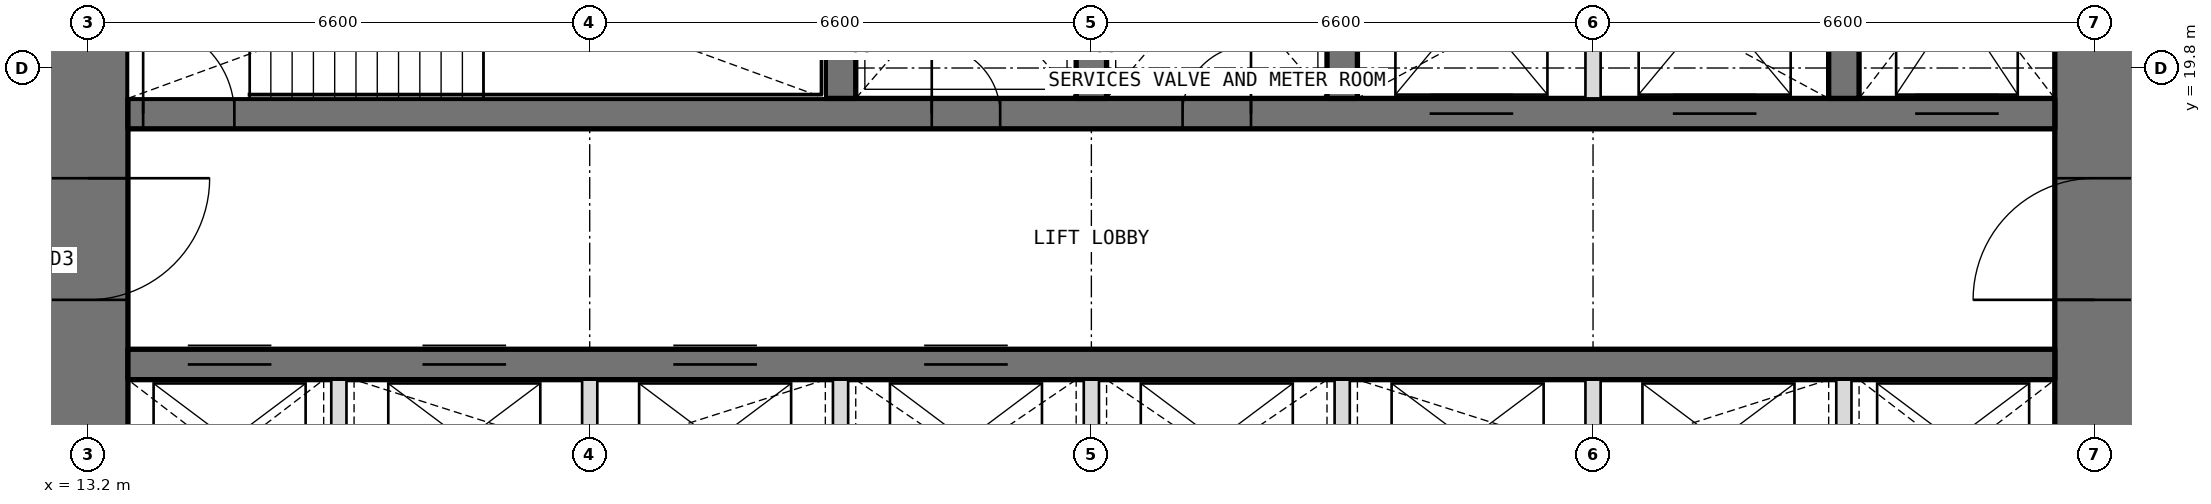
"""IFC4 building model, lengths in metres.
Left out: names, types, materials, properties, quantities, classifications, styles, units other than length and angle.
Written with IfcOpenShell. Run it as: python <this file> out.ifc"""

import sys

from ifc_helpers import new_model, si_unit, direction, frame, frame_2d, origin, place, context, subcontext, project, spatial, rectangle, extrude, element, fill, save


model = new_model("IFC4")
c1 = context("Model", 3, precision=1e-05, world=origin(), true_north=direction((0.0, 1.0)))
c2 = subcontext(c1, "Body", "Model", "MODEL_VIEW")
j1 = project(units=[si_unit("LENGTHUNIT", "METRE"), si_unit("PLANEANGLEUNIT", "RADIAN")], contexts=[c1])
p1 = place(None, origin())
s1 = spatial("IfcSite", under=j1, at=p1, CompositionType="ELEMENT")
p2 = place(p1, origin())
s2 = spatial("IfcBuilding", under=s1, at=p2, CompositionType="ELEMENT")
p3 = place(p2, frame((0.0, 0.0, 59.1)))
s3 = spatial("IfcBuildingStorey", under=s2, at=p3, CompositionType="ELEMENT", Elevation=59.1)
p4 = place(p3, frame((39.6, 13.725, 0.0), z_axis=(0.0, 0.0, 1.0), x_axis=(0.0, 1.0, 0.0)))
e1 = element("IfcWall", 1, at=p4, inside=s3, PredefinedType="SHEAR", context=c2, shape_type="SweptSolid", body=[
    extrude(rectangle(XDim=18.75, YDim=1.05, at=frame_2d((9.375, 0.0))), origin(), (0.0, 0.0, 1.0), 4.2),
])
p5 = place(p4, frame((3.025, 0.0, 0.0)))
e2 = element("IfcOpeningElement", 2, at=p5, cuts=e1, PredefinedType="OPENING", context=c2, shape_type="SweptSolid", body=[
    extrude(rectangle(XDim=1.6, YDim=2.1, at=frame_2d((0.8, 1.05))), frame((0.0, 0.535, 0.0), z_axis=(0.0, -1.0, 0.0), x_axis=(1.0, 0.0, 0.0)), (0.0, 0.0, 1.0), 1.07),
])
p6 = place(p4, frame((13.825, 0.0, 0.0)))
e3 = element("IfcOpeningElement", 3, at=p6, cuts=e1, PredefinedType="OPENING", context=c2, shape_type="SweptSolid", body=[
    extrude(rectangle(XDim=1.6, YDim=2.1, at=frame_2d((0.8, 1.05))), frame((0.0, 0.535, 0.0), z_axis=(0.0, -1.0, 0.0), x_axis=(1.0, 0.0, 0.0)), (0.0, 0.0, 1.0), 1.07),
])
p7 = place(p3, frame((13.2, 32.475, 0.0), z_axis=(0.0, 0.0, 1.0), x_axis=(0.0, -1.0, 0.0)))
e4 = element("IfcWall", 4, at=p7, inside=s3, PredefinedType="SHEAR", context=c2, shape_type="SweptSolid", body=[
    extrude(rectangle(XDim=18.75, YDim=1.05, at=frame_2d((9.375, 0.0))), origin(), (0.0, 0.0, 1.0), 4.2),
])
p8 = place(p7, frame((14.125, 0.0, 0.0)))
e5 = element("IfcOpeningElement", 5, at=p8, cuts=e4, PredefinedType="OPENING", context=c2, shape_type="SweptSolid", body=[
    extrude(rectangle(XDim=1.6, YDim=2.1, at=frame_2d((0.8, 1.05))), frame((0.0, 0.535, 0.0), z_axis=(0.0, -1.0, 0.0), x_axis=(1.0, 0.0, 0.0)), (0.0, 0.0, 1.0), 1.07),
])
p9 = place(p7, frame((3.325, 0.0, 0.0)))
e6 = element("IfcOpeningElement", 6, at=p9, cuts=e4, PredefinedType="OPENING", context=c2, shape_type="SweptSolid", body=[
    extrude(rectangle(XDim=1.6, YDim=2.1, at=frame_2d((0.8, 1.05))), frame((0.0, 0.535, 0.0), z_axis=(0.0, -1.0, 0.0), x_axis=(1.0, 0.0, 0.0)), (0.0, 0.0, 1.0), 1.07),
])
p10 = place(p3, frame((13.725, 15.9, 0.0), z_axis=(0.0, 0.0, 1.0), x_axis=(1.0, 0.0, 0.0)))
e7 = element("IfcWall", 7, at=p10, inside=s3, PredefinedType="SHEAR", context=c2, shape_type="SweptSolid", body=[
    extrude(rectangle(XDim=25.35, YDim=0.4, at=frame_2d((12.675, 0.0))), origin(), (0.0, 0.0, 1.0), 4.2),
])
p11 = place(p10, frame((0.788, 0.0, 0.0)))
e8 = element("IfcOpeningElement", 8, at=p11, cuts=e7, PredefinedType="OPENING", context=c2, shape_type="SweptSolid", body=[
    extrude(rectangle(XDim=1.1, YDim=2.1, at=frame_2d((0.55, 1.05))), frame((0.0, 0.21, 0.0), z_axis=(0.0, -1.0, 0.0), x_axis=(1.0, 0.0, 0.0)), (0.0, 0.0, 1.0), 0.42),
])
p12 = place(p10, frame((3.875, 0.0, 0.0)))
e9 = element("IfcOpeningElement", 9, at=p12, cuts=e7, PredefinedType="OPENING", context=c2, shape_type="SweptSolid", body=[
    extrude(rectangle(XDim=1.1, YDim=2.1, at=frame_2d((0.55, 1.05))), frame((0.0, 0.21, 0.0), z_axis=(0.0, -1.0, 0.0), x_axis=(1.0, 0.0, 0.0)), (0.0, 0.0, 1.0), 0.42),
])
p13 = place(p10, frame((7.175, 0.0, 0.0)))
e10 = element("IfcOpeningElement", 10, at=p13, cuts=e7, PredefinedType="OPENING", context=c2, shape_type="SweptSolid", body=[
    extrude(rectangle(XDim=1.1, YDim=2.1, at=frame_2d((0.55, 1.05))), frame((0.0, 0.21, 0.0), z_axis=(0.0, -1.0, 0.0), x_axis=(1.0, 0.0, 0.0)), (0.0, 0.0, 1.0), 0.42),
])
p14 = place(p10, frame((10.475, 0.0, 0.0)))
e11 = element("IfcOpeningElement", 11, at=p14, cuts=e7, PredefinedType="OPENING", context=c2, shape_type="SweptSolid", body=[
    extrude(rectangle(XDim=1.1, YDim=2.1, at=frame_2d((0.55, 1.05))), frame((0.0, 0.21, 0.0), z_axis=(0.0, -1.0, 0.0), x_axis=(1.0, 0.0, 0.0)), (0.0, 0.0, 1.0), 0.42),
])
p15 = place(p3, frame((13.725, 19.2, 0.0), z_axis=(0.0, 0.0, 1.0), x_axis=(1.0, 0.0, 0.0)))
e12 = element("IfcWall", 12, at=p15, inside=s3, PredefinedType="SHEAR", context=c2, shape_type="SweptSolid", body=[
    extrude(rectangle(XDim=25.35, YDim=0.4, at=frame_2d((12.675, 0.0))), origin(), (0.0, 0.0, 1.0), 4.2),
])
p16 = place(p15, frame((10.575, 0.0, 0.0)))
e13 = element("IfcOpeningElement", 13, at=p16, cuts=e12, PredefinedType="OPENING", context=c2, shape_type="SweptSolid", body=[
    extrude(rectangle(XDim=0.9, YDim=2.1, at=frame_2d((0.45, 1.05))), frame((0.0, 0.21, 0.0), z_axis=(0.0, -1.0, 0.0), x_axis=(1.0, 0.0, 0.0)), (0.0, 0.0, 1.0), 0.42),
])
p17 = place(p15, frame((13.875, 0.0, 0.0)))
e14 = element("IfcOpeningElement", 14, at=p17, cuts=e12, PredefinedType="OPENING", context=c2, shape_type="SweptSolid", body=[
    extrude(rectangle(XDim=0.9, YDim=2.1, at=frame_2d((0.45, 1.05))), frame((0.0, 0.21, 0.0), z_axis=(0.0, -1.0, 0.0), x_axis=(1.0, 0.0, 0.0)), (0.0, 0.0, 1.0), 0.42),
])
p18 = place(p15, frame((0.2, 0.0, 0.0)))
e15 = element("IfcOpeningElement", 15, at=p18, cuts=e12, PredefinedType="OPENING", context=c2, shape_type="SweptSolid", body=[
    extrude(rectangle(XDim=1.2, YDim=2.1, at=frame_2d((0.6, 1.05))), frame((0.0, 0.21, 0.0), z_axis=(0.0, -1.0, 0.0), x_axis=(1.0, 0.0, 0.0)), (0.0, 0.0, 1.0), 0.42),
])
p19 = place(p15, frame((23.512, 0.0, 0.0)))
e16 = element("IfcOpeningElement", 16, at=p19, cuts=e12, PredefinedType="OPENING", context=c2, shape_type="SweptSolid", body=[
    extrude(rectangle(XDim=1.1, YDim=2.1, at=frame_2d((0.55, 1.05))), frame((0.0, 0.21, 0.0), z_axis=(0.0, -1.0, 0.0), x_axis=(1.0, 0.0, 0.0)), (0.0, 0.0, 1.0), 0.42),
])
p20 = place(p15, frame((17.125, 0.0, 0.0)))
e17 = element("IfcOpeningElement", 17, at=p20, cuts=e12, PredefinedType="OPENING", context=c2, shape_type="SweptSolid", body=[
    extrude(rectangle(XDim=1.1, YDim=2.1, at=frame_2d((0.55, 1.05))), frame((0.0, 0.21, 0.0), z_axis=(0.0, -1.0, 0.0), x_axis=(1.0, 0.0, 0.0)), (0.0, 0.0, 1.0), 0.42),
])
p21 = place(p15, frame((20.325, 0.0, 0.0)))
e18 = element("IfcOpeningElement", 18, at=p21, cuts=e12, PredefinedType="OPENING", context=c2, shape_type="SweptSolid", body=[
    extrude(rectangle(XDim=1.1, YDim=2.1, at=frame_2d((0.55, 1.05))), frame((0.0, 0.21, 0.0), z_axis=(0.0, -1.0, 0.0), x_axis=(1.0, 0.0, 0.0)), (0.0, 0.0, 1.0), 0.42),
])
for number, where, z_axis, x_axis in (
    (19, (23.1, 19.4, 0.0), (0.0, 0.0, 1.0), (0.0, 1.0, 0.0)),
    (20, (26.4, 19.4, 0.0), (0.0, 0.0, 1.0), (0.0, 1.0, 0.0)),
    (21, (29.7, 19.4, 0.0), (0.0, 0.0, 1.0), (0.0, 1.0, 0.0)),
    (22, (36.3, 19.4, 0.0), (0.0, 0.0, 1.0), (0.0, 1.0, 0.0)),
):
    element("IfcWall", number, at=place(p3, frame(where, z_axis=z_axis, x_axis=x_axis)), inside=s3, PredefinedType="SHEAR", context=c2, shape_type="SweptSolid", body=[
        extrude(rectangle(XDim=3.35, YDim=0.4, at=frame_2d((1.675, 0.0))), origin(), (0.0, 0.0, 1.0), 4.2),
    ])
for number, where, z_axis, x_axis in (
    (23, (16.5, 13.725, 0.0), (0.0, 0.0, 1.0), (0.0, 1.0, 0.0)),
    (24, (19.8, 13.725, 0.0), (0.0, 0.0, 1.0), (0.0, 1.0, 0.0)),
    (25, (23.1, 13.725, 0.0), (0.0, 0.0, 1.0), (0.0, 1.0, 0.0)),
    (26, (26.4, 13.725, 0.0), (0.0, 0.0, 1.0), (0.0, 1.0, 0.0)),
    (27, (29.7, 13.725, 0.0), (0.0, 0.0, 1.0), (0.0, 1.0, 0.0)),
    (28, (33.0, 13.725, 0.0), (0.0, 0.0, 1.0), (0.0, 1.0, 0.0)),
    (29, (36.3, 13.725, 0.0), (0.0, 0.0, 1.0), (0.0, 1.0, 0.0)),
):
    element("IfcWall", number, at=place(p3, frame(where, z_axis=z_axis, x_axis=x_axis)), inside=s3, PredefinedType="PARTITIONING", context=c2, shape_type="SweptSolid", body=[
        extrude(rectangle(XDim=1.975, YDim=0.2, at=frame_2d((0.987, 0.0))), origin(), (0.0, 0.0, 1.0), 4.2),
    ])
p22 = place(p3, frame((33.0, 19.4, 0.0), z_axis=(0.0, 0.0, 1.0), x_axis=(0.0, 1.0, 0.0)))
e30 = element("IfcWall", 30, at=p22, inside=s3, PredefinedType="PARTITIONING", context=c2, shape_type="SweptSolid", body=[
    extrude(rectangle(XDim=3.35, YDim=0.2, at=frame_2d((1.675, 0.0))), origin(), (0.0, 0.0, 1.0), 4.2),
])
p23 = place(p16, origin())
e31 = element("IfcDoor", 31, at=p23, inside=s3, OperationType="SINGLE_SWING_LEFT", PredefinedType="DOOR", context=c2, shape_type="SweptSolid", body=[
    extrude(rectangle(XDim=0.9, YDim=2.1, at=frame_2d((0.45, 1.05))), frame((0.0, 0.025, 0.0), z_axis=(0.0, -1.0, 0.0), x_axis=(1.0, 0.0, 0.0)), (0.0, 0.0, 1.0), 0.05),
])
fill(e13, e31)
p24 = place(p17, origin())
e32 = element("IfcDoor", 32, at=p24, inside=s3, OperationType="SINGLE_SWING_RIGHT", PredefinedType="DOOR", context=c2, shape_type="SweptSolid", body=[
    extrude(rectangle(XDim=0.9, YDim=2.1, at=frame_2d((0.45, 1.05))), frame((0.0, 0.025, 0.0), z_axis=(0.0, -1.0, 0.0), x_axis=(1.0, 0.0, 0.0)), (0.0, 0.0, 1.0), 0.05),
])
fill(e14, e32)
p25 = place(p18, origin())
e33 = element("IfcDoor", 33, at=p25, inside=s3, OperationType="SINGLE_SWING_LEFT", PredefinedType="DOOR", context=c2, shape_type="SweptSolid", body=[
    extrude(rectangle(XDim=1.2, YDim=2.1, at=frame_2d((0.6, 1.05))), frame((0.0, 0.025, 0.0), z_axis=(0.0, -1.0, 0.0), x_axis=(1.0, 0.0, 0.0)), (0.0, 0.0, 1.0), 0.05),
])
fill(e15, e33)
p26 = place(p8, origin())
e34 = element("IfcDoor", 34, at=p26, inside=s3, OperationType="DOUBLE_DOOR_DOUBLE_SWING", PredefinedType="DOOR", context=c2, shape_type="SweptSolid", body=[
    extrude(rectangle(XDim=1.6, YDim=2.1, at=frame_2d((0.8, 1.05))), frame((0.0, 0.025, 0.0), z_axis=(0.0, -1.0, 0.0), x_axis=(1.0, 0.0, 0.0)), (0.0, 0.0, 1.0), 0.05),
])
fill(e5, e34)
p27 = place(p5, origin())
e35 = element("IfcDoor", 35, at=p27, inside=s3, OperationType="DOUBLE_DOOR_DOUBLE_SWING", PredefinedType="DOOR", context=c2, shape_type="SweptSolid", body=[
    extrude(rectangle(XDim=1.6, YDim=2.1, at=frame_2d((0.8, 1.05))), frame((0.0, 0.025, 0.0), z_axis=(0.0, -1.0, 0.0), x_axis=(1.0, 0.0, 0.0)), (0.0, 0.0, 1.0), 0.05),
])
fill(e2, e35)
p28 = place(p11, origin())
e36 = element("IfcDoor", 36, at=p28, inside=s3, OperationType="DOUBLE_DOOR_SLIDING", PredefinedType="DOOR", context=c2, shape_type="SweptSolid", body=[
    extrude(rectangle(XDim=1.1, YDim=2.1, at=frame_2d((0.55, 1.05))), frame((0.0, 0.025, 0.0), z_axis=(0.0, -1.0, 0.0), x_axis=(1.0, 0.0, 0.0)), (0.0, 0.0, 1.0), 0.05),
])
fill(e8, e36)
p29 = place(p12, origin())
e37 = element("IfcDoor", 37, at=p29, inside=s3, OperationType="DOUBLE_DOOR_SLIDING", PredefinedType="DOOR", context=c2, shape_type="SweptSolid", body=[
    extrude(rectangle(XDim=1.1, YDim=2.1, at=frame_2d((0.55, 1.05))), frame((0.0, 0.025, 0.0), z_axis=(0.0, -1.0, 0.0), x_axis=(1.0, 0.0, 0.0)), (0.0, 0.0, 1.0), 0.05),
])
fill(e9, e37)
p30 = place(p13, origin())
e38 = element("IfcDoor", 38, at=p30, inside=s3, OperationType="DOUBLE_DOOR_SLIDING", PredefinedType="DOOR", context=c2, shape_type="SweptSolid", body=[
    extrude(rectangle(XDim=1.1, YDim=2.1, at=frame_2d((0.55, 1.05))), frame((0.0, 0.025, 0.0), z_axis=(0.0, -1.0, 0.0), x_axis=(1.0, 0.0, 0.0)), (0.0, 0.0, 1.0), 0.05),
])
fill(e10, e38)
p31 = place(p14, origin())
e39 = element("IfcDoor", 39, at=p31, inside=s3, OperationType="DOUBLE_DOOR_SLIDING", PredefinedType="DOOR", context=c2, shape_type="SweptSolid", body=[
    extrude(rectangle(XDim=1.1, YDim=2.1, at=frame_2d((0.55, 1.05))), frame((0.0, 0.025, 0.0), z_axis=(0.0, -1.0, 0.0), x_axis=(1.0, 0.0, 0.0)), (0.0, 0.0, 1.0), 0.05),
])
fill(e11, e39)
p32 = place(p19, origin())
e40 = element("IfcDoor", 40, at=p32, inside=s3, OperationType="DOUBLE_DOOR_SLIDING", PredefinedType="DOOR", context=c2, shape_type="SweptSolid", body=[
    extrude(rectangle(XDim=1.1, YDim=2.1, at=frame_2d((0.55, 1.05))), frame((0.0, 0.025, 0.0), z_axis=(0.0, -1.0, 0.0), x_axis=(1.0, 0.0, 0.0)), (0.0, 0.0, 1.0), 0.05),
])
fill(e16, e40)
p33 = place(p20, origin())
e41 = element("IfcDoor", 41, at=p33, inside=s3, OperationType="DOUBLE_DOOR_SLIDING", PredefinedType="DOOR", context=c2, shape_type="SweptSolid", body=[
    extrude(rectangle(XDim=1.1, YDim=2.1, at=frame_2d((0.55, 1.05))), frame((0.0, 0.025, 0.0), z_axis=(0.0, -1.0, 0.0), x_axis=(1.0, 0.0, 0.0)), (0.0, 0.0, 1.0), 0.05),
])
fill(e17, e41)
p34 = place(p21, origin())
e42 = element("IfcDoor", 42, at=p34, inside=s3, OperationType="DOUBLE_DOOR_SLIDING", PredefinedType="DOOR", context=c2, shape_type="SweptSolid", body=[
    extrude(rectangle(XDim=1.1, YDim=2.1, at=frame_2d((0.55, 1.05))), frame((0.0, 0.025, 0.0), z_axis=(0.0, -1.0, 0.0), x_axis=(1.0, 0.0, 0.0)), (0.0, 0.0, 1.0), 0.05),
])
fill(e18, e42)
save(model, sys.argv[1])
